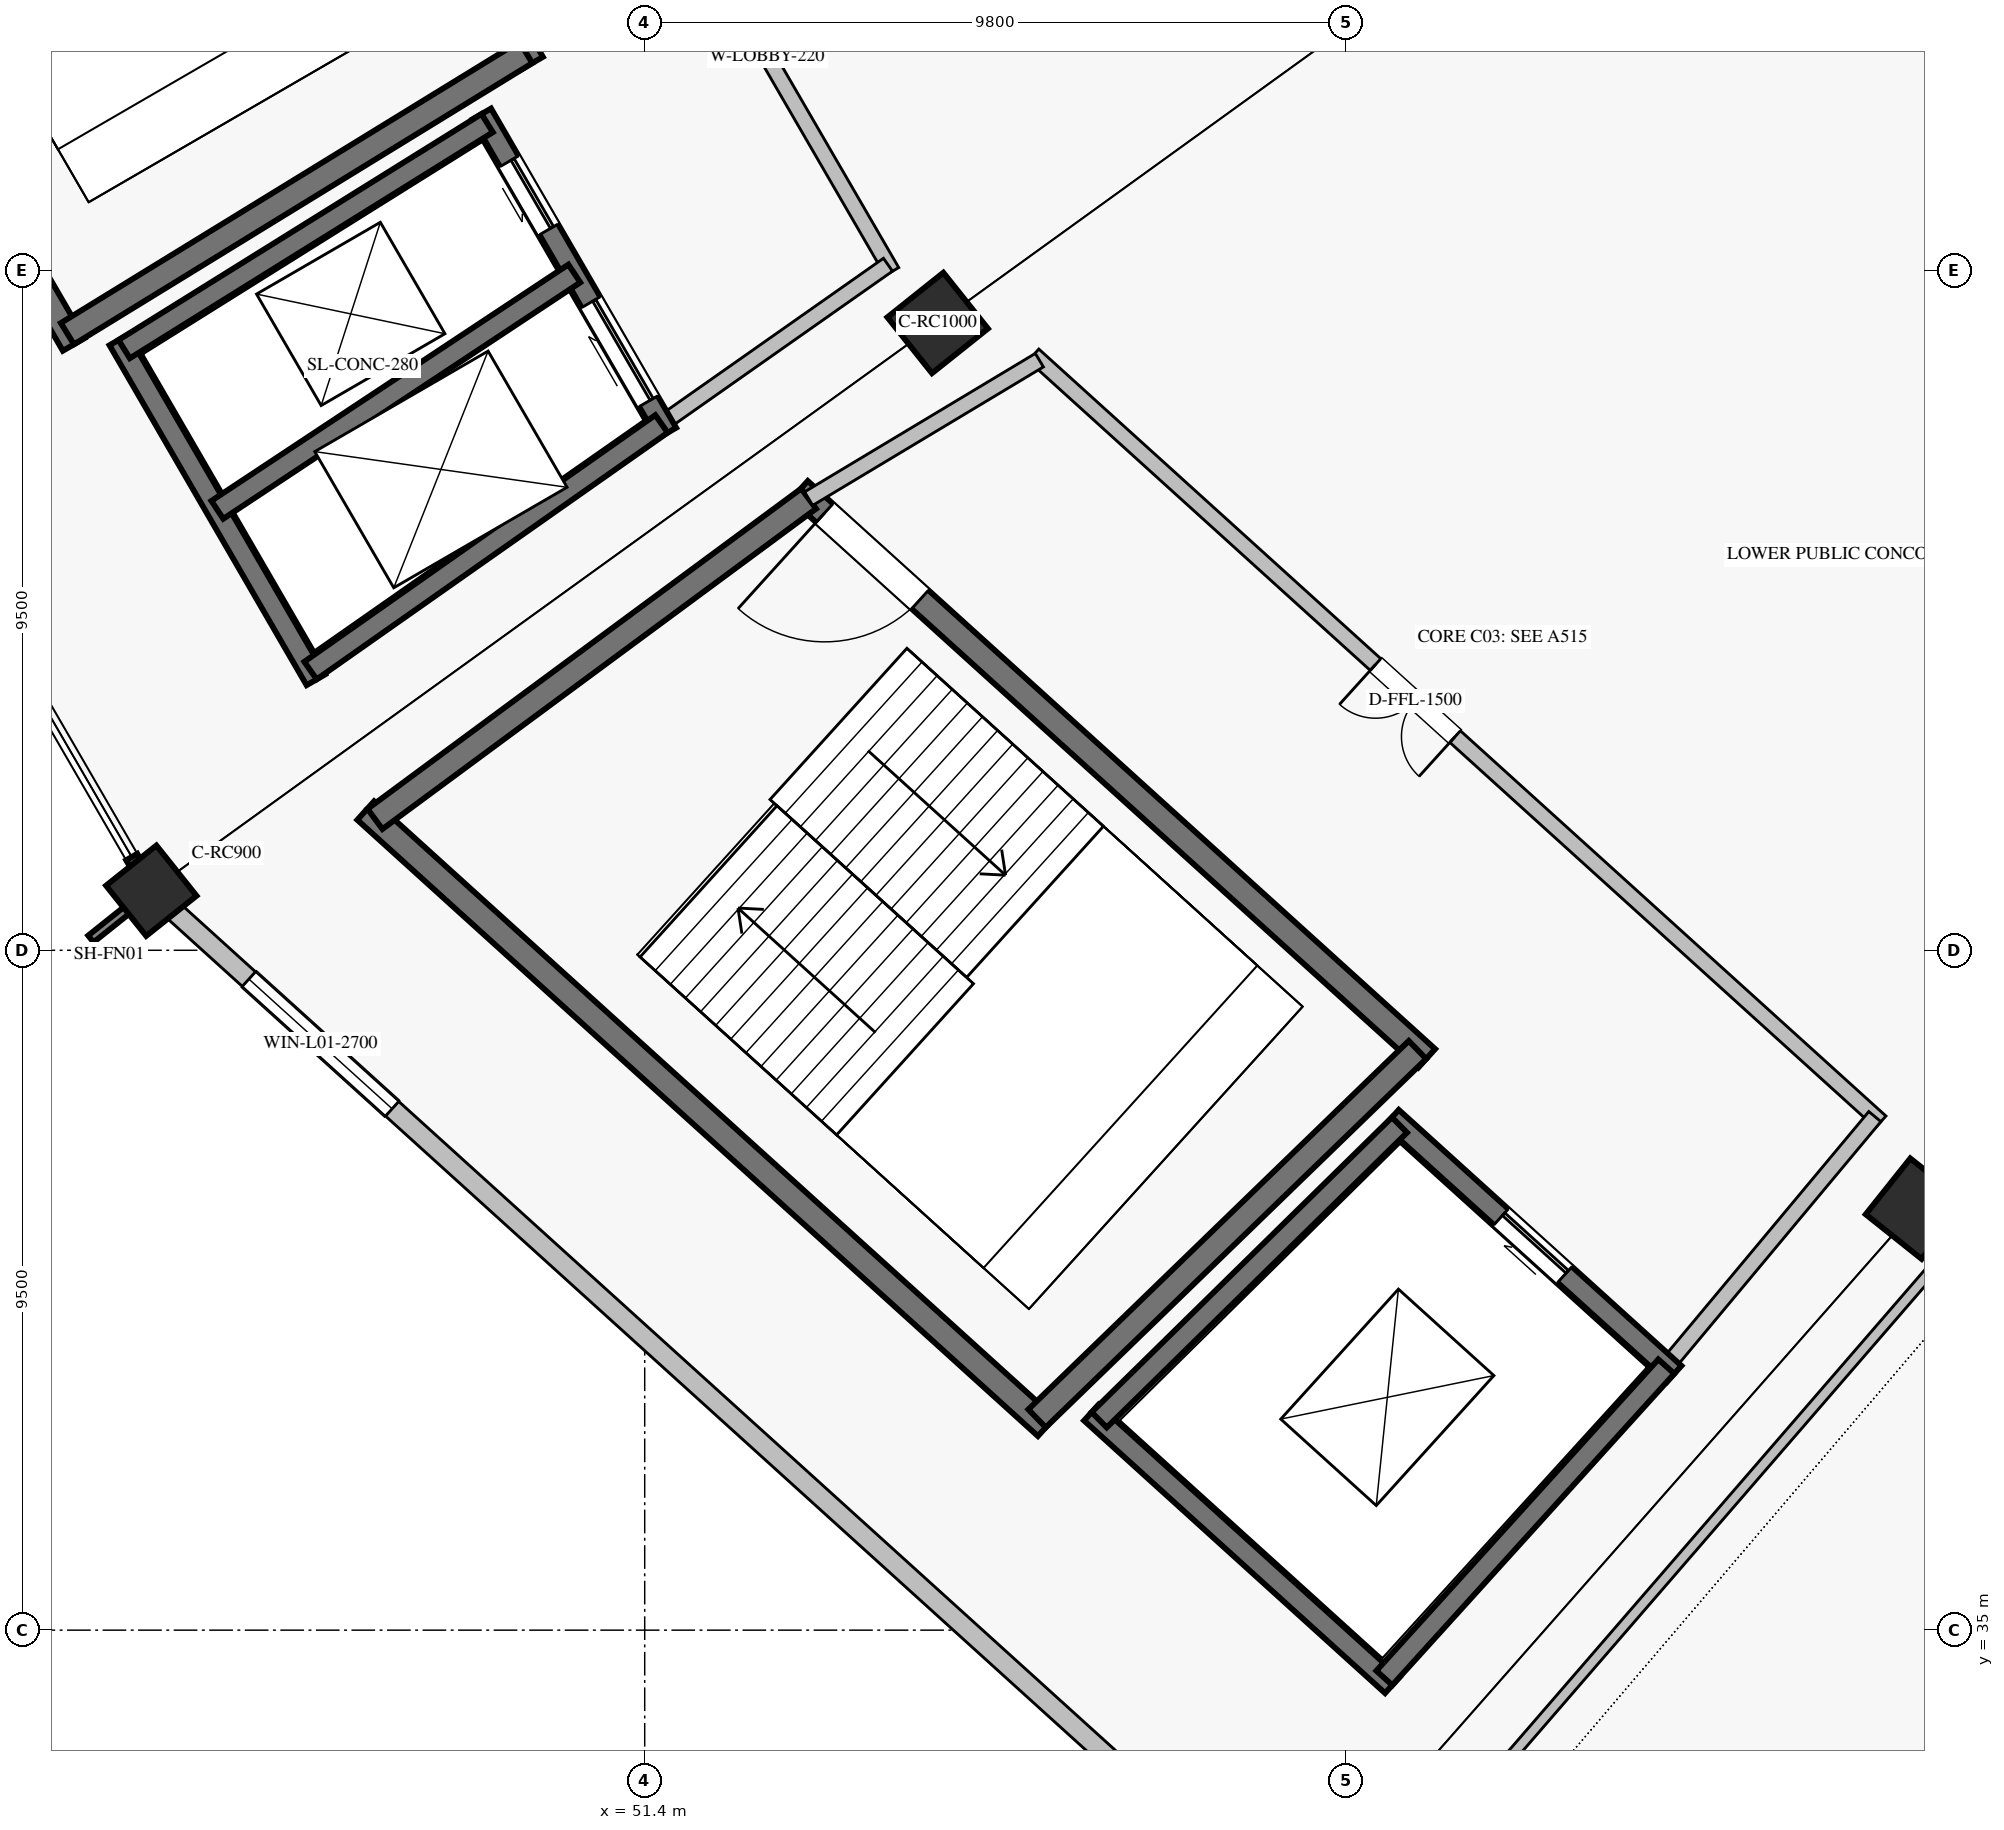
"""IFC4 building model, lengths in metres.
Left out: names, types, materials, properties, quantities, classifications, styles, units other than length and angle.
Written with IfcOpenShell. Run it as: python <this file> out.ifc"""

import sys

from ifc_helpers import new_model, si_unit, direction, frame, frame_2d, origin, origin_2d, place, context, subcontext, project, spatial, rectangle, extrude, element, fill, save


model = new_model("IFC4")
c1 = context("Model", 3, precision=1e-05, world=origin(), true_north=direction((0.0, 1.0)))
c2 = subcontext(c1, "Body", "Model", "MODEL_VIEW")
j1 = project(units=[si_unit("LENGTHUNIT", "METRE"), si_unit("PLANEANGLEUNIT", "RADIAN")], contexts=[c1])
p1 = place(None, origin())
s1 = spatial("IfcSite", under=j1, at=p1, CompositionType="ELEMENT")
p2 = place(p1, origin())
s2 = spatial("IfcBuilding", under=s1, at=p2, CompositionType="ELEMENT")
p3 = place(p2, frame((0.0, 0.0, 5.78)))
s3 = spatial("IfcBuildingStorey", under=s2, at=p3, CompositionType="ELEMENT", Elevation=5.78)
for number, where, z_axis, x_axis in (
    (1, (55.494, 53.266, 0.0), (0.0, 0.0, 1.0), (-0.782, -0.623, 0.0)),
    (2, (69.166, 40.889, 0.0), (0.0, 0.0, 1.0), (-0.623, -0.782, 0.0)),
):
    element("IfcColumn", number, at=place(p3, frame(where, z_axis=z_axis, x_axis=x_axis)), inside=s3, PredefinedType="COLUMN", context=c2, shape_type="SweptSolid", body=[
        extrude(rectangle(XDim=1.0, YDim=1.0, at=origin_2d()), origin(), (0.0, 0.0, 1.0), 4.76),
    ])
p4 = place(p3, frame((44.505, 45.332, 0.0), z_axis=(0.0, 0.0, 1.0), x_axis=(-0.781831482473, -0.623489801853, 0.0)))
e3 = element("IfcColumn", 3, at=p4, inside=s3, PredefinedType="COLUMN", context=c2, shape_type="SweptSolid", body=[
    extrude(rectangle(XDim=0.9, YDim=0.9, at=origin_2d()), origin(), (0.0, 0.0, 1.0), 4.76),
])
p5 = place(p3, frame((44.831, 45.037, 0.0), z_axis=(0.0, 0.0, 1.0), x_axis=(0.741352367697, -0.671115986183, 0.0)))
e4 = element("IfcWall", 4, at=p5, inside=s3, PredefinedType="SOLIDWALL", context=c2, shape_type="SweptSolid", body=[
    extrude(rectangle(XDim=20.564, YDim=0.275, at=frame_2d((10.282, 0.0))), origin(), (0.0, 0.0, 1.0), 3.798),
])
p6 = place(p5, frame((1.4, 0.0, 1.0)))
e5 = element("IfcOpeningElement", 5, at=p6, cuts=e4, PredefinedType="OPENING", context=c2, shape_type="SweptSolid", body=[
    extrude(rectangle(XDim=2.7, YDim=1.9, at=frame_2d((1.35, 0.95))), frame((0.0, 0.147, 0.0), z_axis=(0.0, -1.0, 0.0), x_axis=(1.0, 0.0, 0.0)), (0.0, 0.0, 1.0), 0.295),
])
p7 = place(p3, frame((44.09, 66.788, 0.0), z_axis=(0.0, 0.0, 1.0), x_axis=(0.501628624814, -0.865083072755, 0.0)))
e6 = element("IfcWall", 6, at=p7, inside=s3, PredefinedType="SHEAR", context=c2, shape_type="SweptSolid", body=[
    extrude(rectangle(XDim=11.435, YDim=0.35, at=frame_2d((5.718, 0.0))), origin(), (0.0, 0.0, 1.0), 4.5),
])
p8 = place(p7, frame((0.475, 0.0, 0.0)))
e7 = element("IfcOpeningElement", 7, at=p8, cuts=e6, PredefinedType="OPENING", context=c2, shape_type="SweptSolid", body=[
    extrude(rectangle(XDim=1.8, YDim=2.2, at=frame_2d((0.9, 1.1))), frame((0.0, 0.185, 0.0), z_axis=(0.0, -1.0, 0.0), x_axis=(1.0, 0.0, 0.0)), (0.0, 0.0, 1.0), 0.37),
])
p9 = place(p3, frame((37.198, 63.695, 0.0), z_axis=(0.0, 0.0, 1.0), x_axis=(0.501601740165, -0.865098661577, 0.0)))
e8 = element("IfcWall", 8, at=p9, inside=s3, PredefinedType="SHEAR", context=c2, shape_type="SweptSolid", body=[
    extrude(rectangle(XDim=12.405, YDim=0.35, at=frame_2d((6.202, 0.0))), origin(), (0.0, 0.0, 1.0), 4.5),
])
p10 = place(p3, frame((49.739, 57.046, 0.0), z_axis=(0.0, 0.0, 1.0), x_axis=(-0.852334575619, -0.522996913188, 0.0)))
e9 = element("IfcWall", 9, at=p10, inside=s3, PredefinedType="SHEAR", context=c2, shape_type="SweptSolid", body=[
    extrude(rectangle(XDim=7.516, YDim=0.35, at=frame_2d((3.758, 0.0))), origin(), (0.0, 0.0, 1.0), 4.5),
])
p11 = place(p3, frame((49.123, 56.188, 0.0), z_axis=(0.0, 0.0, 1.0), x_axis=(0.501629534056, -0.86508254552, 0.0)))
e10 = element("IfcWall", 10, at=p11, inside=s3, PredefinedType="SHEAR", context=c2, shape_type="SweptSolid", body=[
    extrude(rectangle(XDim=5.157, YDim=0.3, at=frame_2d((2.579, 0.0))), origin(), (0.0, 0.0, 1.0), 4.5),
])
p12 = place(p11, frame((0.766, 0.0, 0.0)))
e11 = element("IfcOpeningElement", 11, at=p12, cuts=e10, PredefinedType="OPENING", context=c2, shape_type="SweptSolid", body=[
    extrude(rectangle(XDim=1.1, YDim=2.2, at=frame_2d((0.55, 1.1))), frame((0.0, 0.16, 0.0), z_axis=(0.0, -1.0, 0.0), x_axis=(1.0, 0.0, 0.0)), (0.0, 0.0, 1.0), 0.32),
])
p13 = place(p11, frame((3.042, 0.0, 0.0)))
e12 = element("IfcOpeningElement", 12, at=p13, cuts=e10, PredefinedType="OPENING", context=c2, shape_type="SweptSolid", body=[
    extrude(rectangle(XDim=1.6, YDim=2.3, at=frame_2d((0.8, 1.15))), frame((0.0, 0.16, 0.0), z_axis=(0.0, -1.0, 0.0), x_axis=(1.0, 0.0, 0.0)), (0.0, 0.0, 1.0), 0.32),
])
p14 = place(p3, frame((44.05, 53.03, 0.0), z_axis=(0.0, 0.0, 1.0), x_axis=(0.501596987756, -0.865101417103, 0.0)))
e13 = element("IfcWall", 13, at=p14, inside=s3, PredefinedType="SHEAR", context=c2, shape_type="SweptSolid", body=[
    extrude(rectangle(XDim=5.491, YDim=0.3, at=frame_2d((2.746, 0.0))), origin(), (0.0, 0.0, 1.0), 4.5),
])
p15 = place(p3, frame((49.198, 56.058, 0.0), z_axis=(0.0, 0.0, 1.0), x_axis=(-0.848938067893, -0.528492343257, 0.0)))
e14 = element("IfcWall", 14, at=p15, inside=s3, PredefinedType="SHEAR", context=c2, shape_type="SweptSolid", body=[
    extrude(rectangle(XDim=5.975, YDim=0.3, at=frame_2d((2.988, 0.0))), origin(), (0.0, 0.0, 1.0), 4.5),
])
p16 = place(p3, frame((51.635, 51.855, 0.0), z_axis=(0.0, 0.0, 1.0), x_axis=(-0.818205158105, -0.574926359851, 0.0)))
e15 = element("IfcWall", 15, at=p16, inside=s3, PredefinedType="SHEAR", context=c2, shape_type="SweptSolid", body=[
    extrude(rectangle(XDim=5.995, YDim=0.3, at=frame_2d((2.998, 0.0))), origin(), (0.0, 0.0, 1.0), 4.5),
])
p17 = place(p3, frame((50.417, 53.957, 0.0), z_axis=(0.0, 0.0, 1.0), x_axis=(-0.833878900042, -0.551947443209, 0.0)))
e16 = element("IfcWall", 16, at=p17, inside=s3, PredefinedType="SHEAR", context=c2, shape_type="SweptSolid", body=[
    extrude(rectangle(XDim=5.983, YDim=0.3, at=frame_2d((2.991, 0.0))), origin(), (0.0, 0.0, 1.0), 4.5),
])
p18 = place(p3, frame((46.774, 67.921, 0.0), z_axis=(0.0, 0.0, 1.0), x_axis=(0.501612626242, -0.865092349518, 0.0)))
e17 = element("IfcWall", 17, at=p18, inside=s3, PredefinedType="SOLIDWALL", context=c2, shape_type="SweptSolid", body=[
    extrude(rectangle(XDim=16.11, YDim=0.22, at=frame_2d((8.055, 0.0))), origin(), (0.0, 0.0, 1.0), 3.448),
])
p19 = place(p18, frame((6.511, 0.0, 0.0)))
e18 = element("IfcOpeningElement", 18, at=p19, cuts=e17, PredefinedType="OPENING", context=c2, shape_type="SweptSolid", body=[
    extrude(rectangle(XDim=1.5, YDim=2.2, at=frame_2d((0.75, 1.1))), frame((0.0, 0.12, 0.0), z_axis=(0.0, -1.0, 0.0), x_axis=(1.0, 0.0, 0.0)), (0.0, 0.0, 1.0), 0.24),
])
p20 = place(p3, frame((54.8, 54.079, 0.0), z_axis=(0.0, 0.0, 1.0), x_axis=(-0.818225400643, -0.574897550649, 0.0)))
e19 = element("IfcWall", 19, at=p20, inside=s3, PredefinedType="SOLIDWALL", context=c2, shape_type="SweptSolid", body=[
    extrude(rectangle(XDim=3.868, YDim=0.22, at=frame_2d((1.934, 0.0))), origin(), (0.0, 0.0, 1.0), 4.5),
])
p21 = place(p3, frame((53.561, 50.928, 0.0), z_axis=(0.0, 0.0, 1.0), x_axis=(0.741358227035, -0.671109513572, 0.0)))
e20 = element("IfcWall", 20, at=p21, inside=s3, PredefinedType="SHEAR", context=c2, shape_type="SweptSolid", body=[
    extrude(rectangle(XDim=11.827, YDim=0.35, at=frame_2d((5.913, 0.0))), origin(), (0.0, 0.0, 1.0), 4.5),
])
p22 = place(p21, frame((0.475, 0.0, 0.0)))
e21 = element("IfcOpeningElement", 21, at=p22, cuts=e20, PredefinedType="OPENING", context=c2, shape_type="SweptSolid", body=[
    extrude(rectangle(XDim=1.8, YDim=2.2, at=frame_2d((0.9, 1.1))), frame((0.0, 0.185, 0.0), z_axis=(0.0, -1.0, 0.0), x_axis=(1.0, 0.0, 0.0)), (0.0, 0.0, 1.0), 0.37),
])
p23 = place(p3, frame((47.501, 46.452, 0.0), z_axis=(0.0, 0.0, 1.0), x_axis=(0.741351373721, -0.671117084183, 0.0)))
e22 = element("IfcWall", 22, at=p23, inside=s3, PredefinedType="SHEAR", context=c2, shape_type="SweptSolid", body=[
    extrude(rectangle(XDim=12.83, YDim=0.35, at=frame_2d((6.415, 0.0))), origin(), (0.0, 0.0, 1.0), 4.5),
])
p24 = place(p3, frame((53.691, 50.811, 0.0), z_axis=(0.0, 0.0, 1.0), x_axis=(-0.804395625347, -0.594093997548, 0.0)))
e23 = element("IfcWall", 23, at=p24, inside=s3, PredefinedType="SHEAR", context=c2, shape_type="SweptSolid", body=[
    extrude(rectangle(XDim=7.534, YDim=0.35, at=frame_2d((3.767, 0.0))), origin(), (0.0, 0.0, 1.0), 4.5),
])
p25 = place(p3, frame((62.199, 43.108, 0.0), z_axis=(0.0, 0.0, 1.0), x_axis=(-0.718297398554, -0.69573619083, 0.0)))
e24 = element("IfcWall", 24, at=p25, inside=s3, PredefinedType="SHEAR", context=c2, shape_type="SweptSolid", body=[
    extrude(rectangle(XDim=7.402, YDim=0.35, at=frame_2d((3.701, 0.0))), origin(), (0.0, 0.0, 1.0), 4.5),
])
p26 = place(p3, frame((61.837, 42.159, 0.0), z_axis=(0.0, 0.0, 1.0), x_axis=(0.741350155641, -0.671118429736, 0.0)))
e25 = element("IfcWall", 25, at=p26, inside=s3, PredefinedType="SHEAR", context=c2, shape_type="SweptSolid", body=[
    extrude(rectangle(XDim=5.329, YDim=0.3, at=frame_2d((2.665, 0.0))), origin(), (0.0, 0.0, 1.0), 4.5),
])
p27 = place(p26, frame((2.065, 0.0, 0.0)))
e26 = element("IfcOpeningElement", 26, at=p27, cuts=e25, PredefinedType="OPENING", context=c2, shape_type="SweptSolid", body=[
    extrude(rectangle(XDim=1.2, YDim=2.2, at=frame_2d((0.6, 1.1))), frame((0.0, 0.16, 0.0), z_axis=(0.0, -1.0, 0.0), x_axis=(1.0, 0.0, 0.0)), (0.0, 0.0, 1.0), 0.32),
])
p28 = place(p3, frame((57.64, 38.039, 0.0), z_axis=(0.0, 0.0, 1.0), x_axis=(0.74134208775, -0.671127341815, 0.0)))
e27 = element("IfcWall", 27, at=p28, inside=s3, PredefinedType="SHEAR", context=c2, shape_type="SweptSolid", body=[
    extrude(rectangle(XDim=5.675, YDim=0.3, at=frame_2d((2.837, 0.0))), origin(), (0.0, 0.0, 1.0), 4.5),
])
p29 = place(p3, frame((61.948, 42.059, 0.0), z_axis=(0.0, 0.0, 1.0), x_axis=(-0.713553028001, -0.700601224828, 0.0)))
e28 = element("IfcWall", 28, at=p29, inside=s3, PredefinedType="SHEAR", context=c2, shape_type="SweptSolid", body=[
    extrude(rectangle(XDim=5.881, YDim=0.3, at=frame_2d((2.94, 0.0))), origin(), (0.0, 0.0, 1.0), 4.5),
])
p30 = place(p3, frame((65.676, 38.684, 0.0), z_axis=(0.0, 0.0, 1.0), x_axis=(-0.67115829282, -0.741314067031, 0.0)))
e29 = element("IfcWall", 29, at=p30, inside=s3, PredefinedType="SHEAR", context=c2, shape_type="SweptSolid", body=[
    extrude(rectangle(XDim=5.871, YDim=0.3, at=frame_2d((2.935, 0.0))), origin(), (0.0, 0.0, 1.0), 4.5),
])
p31 = place(p3, frame((56.834, 52.819, 0.0), z_axis=(0.0, 0.0, 1.0), x_axis=(0.741351035574, -0.671117457717, 0.0)))
e30 = element("IfcWall", 30, at=p31, inside=s3, PredefinedType="SOLIDWALL", context=c2, shape_type="SweptSolid", body=[
    extrude(rectangle(XDim=15.969, YDim=0.22, at=frame_2d((7.985, 0.0))), origin(), (0.0, 0.0, 1.0), 4.5),
])
p32 = place(p31, frame((6.447, 0.0, 0.0)))
e31 = element("IfcOpeningElement", 31, at=p32, cuts=e30, PredefinedType="OPENING", context=c2, shape_type="SweptSolid", body=[
    extrude(rectangle(XDim=1.5, YDim=2.2, at=frame_2d((0.75, 1.1))), frame((0.0, 0.12, 0.0), z_axis=(0.0, -1.0, 0.0), x_axis=(1.0, 0.0, 0.0)), (0.0, 0.0, 1.0), 0.24),
])
p33 = place(p3, frame((56.915, 52.746, 0.0), z_axis=(0.0, 0.0, 1.0), x_axis=(-0.857424171966, -0.514610327654, 0.0)))
e32 = element("IfcWall", 32, at=p33, inside=s3, PredefinedType="SOLIDWALL", context=c2, shape_type="SweptSolid", body=[
    extrude(rectangle(XDim=3.76, YDim=0.22, at=frame_2d((1.88, 0.0))), origin(), (0.0, 0.0, 1.0), 4.5),
])
p34 = place(p3, frame((68.591, 42.176, 0.0), z_axis=(0.0, 0.0, 1.0), x_axis=(-0.640759627034, -0.767741558315, 0.0)))
e33 = element("IfcWall", 33, at=p34, inside=s3, PredefinedType="SOLIDWALL", context=c2, shape_type="SweptSolid", body=[
    extrude(rectangle(XDim=4.549, YDim=0.22, at=frame_2d((2.274, 0.0))), origin(), (0.0, 0.0, 1.0), 4.5),
])
p35 = place(p3, frame((69.599, 40.28, 0.0), z_axis=(0.0, 0.0, 1.0), x_axis=(-0.654293035882, -0.756241114458, 0.0)))
e34 = element("IfcWall", 34, at=p35, inside=s3, PredefinedType="PARTITIONING", context=c2, shape_type="SweptSolid", body=[
    extrude(rectangle(XDim=12.091, YDim=0.15, at=frame_2d((6.045, 0.0))), origin(), (0.0, 0.0, 1.0), 3.82),
])
p36 = place(p6, origin())
e35 = element("IfcWindow", 35, at=p36, inside=s3, PartitioningType="SINGLE_PANEL", PredefinedType="WINDOW", context=c2, shape_type="SweptSolid", body=[
    extrude(rectangle(XDim=2.7, YDim=1.9, at=frame_2d((1.35, 0.95))), frame((0.0, 0.03, 0.0), z_axis=(0.0, -1.0, 0.0), x_axis=(1.0, 0.0, 0.0)), (0.0, 0.0, 1.0), 0.06),
])
fill(e5, e35)
p37 = place(p12, origin())
e36 = element("IfcDoor", 36, at=p37, inside=s3, OperationType="SLIDING_TO_RIGHT", PredefinedType="DOOR", context=c2, shape_type="SweptSolid", body=[
    extrude(rectangle(XDim=1.1, YDim=2.2, at=frame_2d((0.55, 1.1))), frame((0.0, 0.025, 0.0), z_axis=(0.0, -1.0, 0.0), x_axis=(1.0, 0.0, 0.0)), (0.0, 0.0, 1.0), 0.05),
])
fill(e11, e36)
p38 = place(p13, origin())
e37 = element("IfcDoor", 37, at=p38, inside=s3, OperationType="SLIDING_TO_LEFT", PredefinedType="DOOR", context=c2, shape_type="SweptSolid", body=[
    extrude(rectangle(XDim=1.6, YDim=2.3, at=frame_2d((0.8, 1.15))), frame((0.0, 0.025, 0.0), z_axis=(0.0, -1.0, 0.0), x_axis=(1.0, 0.0, 0.0)), (0.0, 0.0, 1.0), 0.05),
])
fill(e12, e37)
p39 = place(p22, frame((1.8, 0.0, 0.0), z_axis=(0.0, 0.0, 1.0), x_axis=(-1.0, 0.0, 0.0)))
e38 = element("IfcDoor", 38, at=p39, inside=s3, OperationType="SINGLE_SWING_RIGHT", PredefinedType="DOOR", context=c2, shape_type="SweptSolid", body=[
    extrude(rectangle(XDim=1.8, YDim=2.2, at=frame_2d((0.9, 1.1))), frame((0.0, 0.025, 0.0), z_axis=(0.0, -1.0, 0.0), x_axis=(1.0, 0.0, 0.0)), (0.0, 0.0, 1.0), 0.05),
])
fill(e21, e38)
p40 = place(p27, origin())
e39 = element("IfcDoor", 39, at=p40, inside=s3, OperationType="SLIDING_TO_LEFT", PredefinedType="DOOR", context=c2, shape_type="SweptSolid", body=[
    extrude(rectangle(XDim=1.2, YDim=2.2, at=frame_2d((0.6, 1.1))), frame((0.0, 0.025, 0.0), z_axis=(0.0, -1.0, 0.0), x_axis=(1.0, 0.0, 0.0)), (0.0, 0.0, 1.0), 0.05),
])
fill(e26, e39)
p41 = place(p32, frame((1.5, 0.0, 0.0), z_axis=(0.0, 0.0, 1.0), x_axis=(-1.0, 0.0, 0.0)))
e40 = element("IfcDoor", 40, at=p41, inside=s3, OperationType="DOUBLE_DOOR_SINGLE_SWING", PredefinedType="DOOR", context=c2, shape_type="SweptSolid", body=[
    extrude(rectangle(XDim=1.5, YDim=2.2, at=frame_2d((0.75, 1.1))), frame((0.0, 0.025, 0.0), z_axis=(0.0, -1.0, 0.0), x_axis=(1.0, 0.0, 0.0)), (0.0, 0.0, 1.0), 0.05),
])
fill(e31, e40)
save(model, sys.argv[1])
